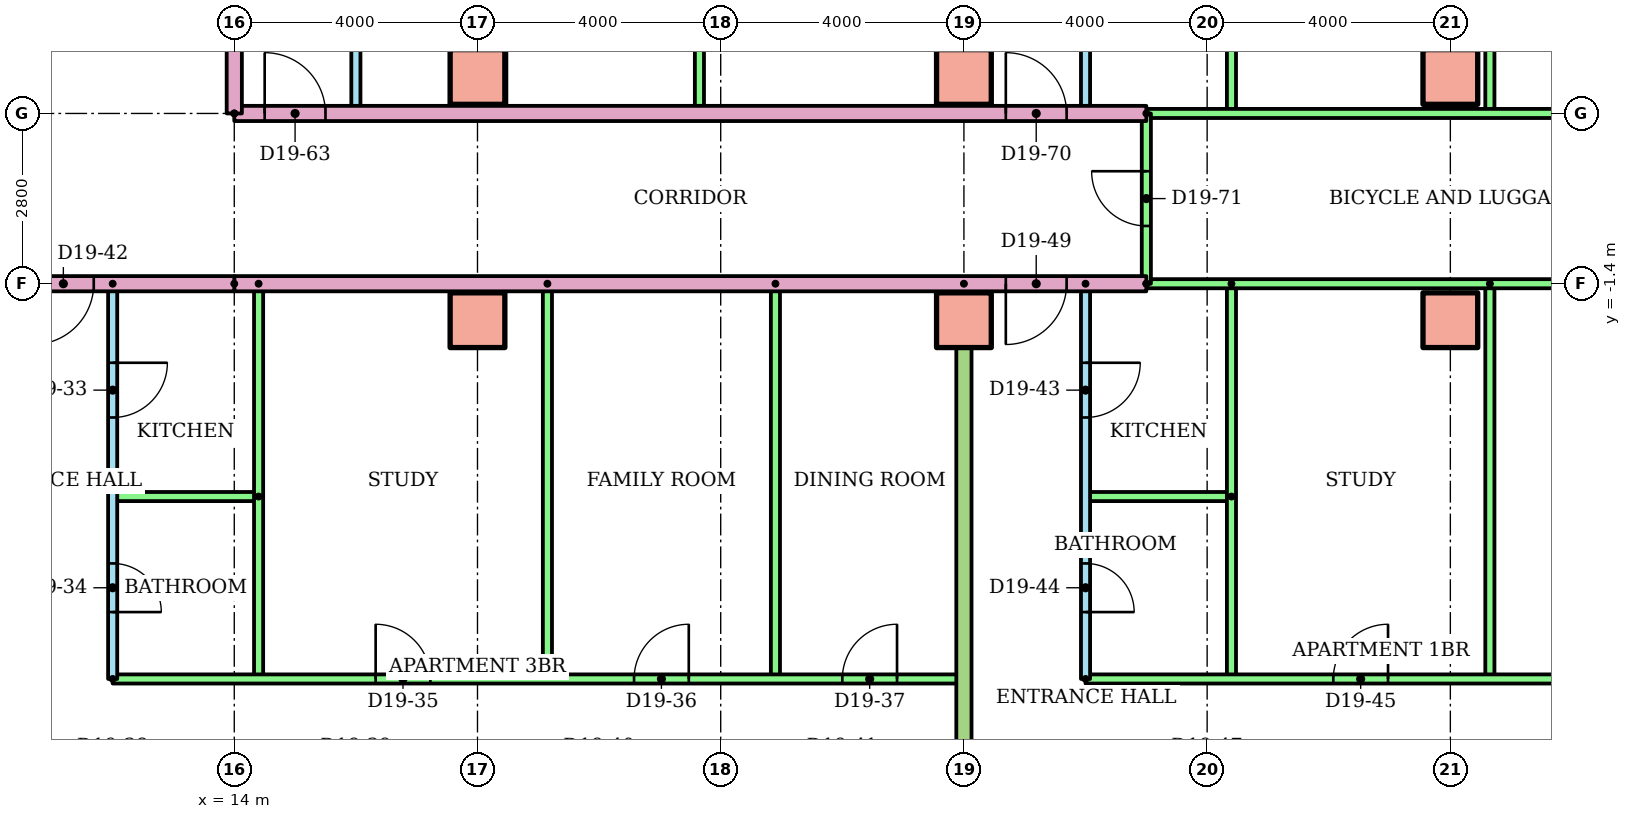
"""IFC4 building model, lengths in metres.
Left out: names, types, materials, properties, quantities, classifications, styles, units other than length and angle.
Written with IfcOpenShell. Run it as: python <this file> out.ifc"""

import sys

from ifc_helpers import new_model, si_unit, direction, frame, frame_2d, origin, origin_2d, place, context, subcontext, project, spatial, rectangle, extrude, element, fill, save


model = new_model("IFC4")
c1 = context("Model", 3, precision=1e-05, world=origin(), true_north=direction((0.0, 1.0)))
c2 = subcontext(c1, "Body", "Model", "MODEL_VIEW")
j1 = project(units=[si_unit("LENGTHUNIT", "METRE"), si_unit("PLANEANGLEUNIT", "RADIAN")], contexts=[c1])
p1 = place(None, origin())
s1 = spatial("IfcSite", under=j1, at=p1, CompositionType="ELEMENT")
p2 = place(p1, origin())
s2 = spatial("IfcBuilding", under=s1, at=p2, CompositionType="ELEMENT")
p3 = place(p2, frame((0.0, 0.0, 77.5)))
s3 = spatial("IfcBuildingStorey", under=s2, at=p3, CompositionType="ELEMENT", Elevation=77.5)
for number, where in (
    (1, (18.0, -2.0, 0.0)),
    (2, (26.0, -2.0, 0.0)),
    (3, (34.0, -2.0, 0.0)),
    (4, (18.0, 2.0, 0.0)),
    (5, (26.0, 2.0, 0.0)),
    (6, (34.0, 2.0, 0.0)),
):
    element("IfcColumn", number, at=place(p3, frame(where)), inside=s3, PredefinedType="COLUMN", context=c2, shape_type="SweptSolid", body=[
        extrude(rectangle(XDim=0.9, YDim=0.9, at=origin_2d()), origin(), (0.0, 0.0, 1.0), 3.2),
    ])
p4 = place(p3, frame((12.0, -1.4, 0.0), z_axis=(0.0, 0.0, 1.0), x_axis=(0.0, -1.0, 0.0)))
e7 = element("IfcWall", 7, at=p4, inside=s3, PredefinedType="PARTITIONING", context=c2, shape_type="SweptSolid", body=[
    extrude(rectangle(XDim=6.5, YDim=0.15, at=frame_2d((3.25, 0.0))), origin(), (0.0, 0.0, 1.0), 2.4),
])
p5 = place(p4, frame((1.3, 0.0, 0.0)))
e8 = element("IfcOpeningElement", 8, at=p5, cuts=e7, PredefinedType="OPENING", context=c2, shape_type="SweptSolid", body=[
    extrude(rectangle(XDim=0.9, YDim=2.1, at=frame_2d((0.45, 1.05))), frame((0.0, 0.085, 0.0), z_axis=(0.0, -1.0, 0.0), x_axis=(1.0, 0.0, 0.0)), (0.0, 0.0, 1.0), 0.17),
])
p6 = place(p4, frame((4.6, 0.0, 0.0)))
e9 = element("IfcOpeningElement", 9, at=p6, cuts=e7, PredefinedType="OPENING", context=c2, shape_type="SweptSolid", body=[
    extrude(rectangle(XDim=0.8, YDim=2.1, at=frame_2d((0.4, 1.05))), frame((0.0, 0.085, 0.0), z_axis=(0.0, -1.0, 0.0), x_axis=(1.0, 0.0, 0.0)), (0.0, 0.0, 1.0), 0.17),
])
p7 = place(p3, frame((14.4, -4.9, 0.0), z_axis=(0.0, 0.0, 1.0), x_axis=(-1.0, 0.0, 0.0)))
e10 = element("IfcWall", 10, at=p7, inside=s3, PredefinedType="PARTITIONING", context=c2, shape_type="SweptSolid", body=[
    extrude(rectangle(XDim=2.4, YDim=0.15, at=frame_2d((1.2, 0.0))), origin(), (0.0, 0.0, 1.0), 2.4),
])
for number, where, z_axis, x_axis in (
    (11, (14.4, -1.4, 0.0), (0.0, 0.0, 1.0), (0.0, -1.0, 0.0)),
    (12, (19.15, -1.4, 0.0), (0.0, 0.0, 1.0), (0.0, -1.0, 0.0)),
    (13, (22.9, -1.4, 0.0), (0.0, 0.0, 1.0), (0.0, -1.0, 0.0)),
):
    element("IfcWall", number, at=place(p3, frame(where, z_axis=z_axis, x_axis=x_axis)), inside=s3, PredefinedType="PARTITIONING", context=c2, shape_type="SweptSolid", body=[
        extrude(rectangle(XDim=6.5, YDim=0.15, at=frame_2d((3.25, 0.0))), origin(), (0.0, 0.0, 1.0), 2.4),
    ])
p8 = place(p3, frame((12.0, -7.9, 0.0)))
e14 = element("IfcWall", 14, at=p8, inside=s3, PredefinedType="PARTITIONING", context=c2, shape_type="SweptSolid", body=[
    extrude(rectangle(XDim=14.0, YDim=0.15, at=frame_2d((7.0, 0.0))), origin(), (0.0, 0.0, 1.0), 2.4),
])
p9 = place(p8, frame((4.325, 0.0, 0.0)))
e15 = element("IfcOpeningElement", 15, at=p9, cuts=e14, PredefinedType="OPENING", context=c2, shape_type="SweptSolid", body=[
    extrude(rectangle(XDim=0.9, YDim=2.1, at=frame_2d((0.45, 1.05))), frame((0.0, 0.085, 0.0), z_axis=(0.0, -1.0, 0.0), x_axis=(1.0, 0.0, 0.0)), (0.0, 0.0, 1.0), 0.17),
])
p10 = place(p8, frame((8.575, 0.0, 0.0)))
e16 = element("IfcOpeningElement", 16, at=p10, cuts=e14, PredefinedType="OPENING", context=c2, shape_type="SweptSolid", body=[
    extrude(rectangle(XDim=0.9, YDim=2.1, at=frame_2d((0.45, 1.05))), frame((0.0, 0.085, 0.0), z_axis=(0.0, -1.0, 0.0), x_axis=(1.0, 0.0, 0.0)), (0.0, 0.0, 1.0), 0.17),
])
p11 = place(p8, frame((12.0, 0.0, 0.0)))
e17 = element("IfcOpeningElement", 17, at=p11, cuts=e14, PredefinedType="OPENING", context=c2, shape_type="SweptSolid", body=[
    extrude(rectangle(XDim=0.9, YDim=2.1, at=frame_2d((0.45, 1.05))), frame((0.0, 0.085, 0.0), z_axis=(0.0, -1.0, 0.0), x_axis=(1.0, 0.0, 0.0)), (0.0, 0.0, 1.0), 0.17),
])
p12 = place(p3, frame((28.0, -1.4, 0.0), z_axis=(0.0, 0.0, 1.0), x_axis=(0.0, -1.0, 0.0)))
e18 = element("IfcWall", 18, at=p12, inside=s3, PredefinedType="PARTITIONING", context=c2, shape_type="SweptSolid", body=[
    extrude(rectangle(XDim=6.5, YDim=0.15, at=frame_2d((3.25, 0.0))), origin(), (0.0, 0.0, 1.0), 2.4),
])
p13 = place(p12, frame((1.3, 0.0, 0.0)))
e19 = element("IfcOpeningElement", 19, at=p13, cuts=e18, PredefinedType="OPENING", context=c2, shape_type="SweptSolid", body=[
    extrude(rectangle(XDim=0.9, YDim=2.1, at=frame_2d((0.45, 1.05))), frame((0.0, 0.085, 0.0), z_axis=(0.0, -1.0, 0.0), x_axis=(1.0, 0.0, 0.0)), (0.0, 0.0, 1.0), 0.17),
])
p14 = place(p12, frame((4.6, 0.0, 0.0)))
e20 = element("IfcOpeningElement", 20, at=p14, cuts=e18, PredefinedType="OPENING", context=c2, shape_type="SweptSolid", body=[
    extrude(rectangle(XDim=0.8, YDim=2.1, at=frame_2d((0.4, 1.05))), frame((0.0, 0.085, 0.0), z_axis=(0.0, -1.0, 0.0), x_axis=(1.0, 0.0, 0.0)), (0.0, 0.0, 1.0), 0.17),
])
p15 = place(p3, frame((30.4, -4.9, 0.0), z_axis=(0.0, 0.0, 1.0), x_axis=(-1.0, 0.0, 0.0)))
e21 = element("IfcWall", 21, at=p15, inside=s3, PredefinedType="PARTITIONING", context=c2, shape_type="SweptSolid", body=[
    extrude(rectangle(XDim=2.4, YDim=0.15, at=frame_2d((1.2, 0.0))), origin(), (0.0, 0.0, 1.0), 2.4),
])
for number, where, z_axis, x_axis in (
    (22, (30.4, -1.4, 0.0), (0.0, 0.0, 1.0), (0.0, -1.0, 0.0)),
    (23, (34.65, -1.4, 0.0), (0.0, 0.0, 1.0), (0.0, -1.0, 0.0)),
):
    element("IfcWall", number, at=place(p3, frame(where, z_axis=z_axis, x_axis=x_axis)), inside=s3, PredefinedType="PARTITIONING", context=c2, shape_type="SweptSolid", body=[
        extrude(rectangle(XDim=6.5, YDim=0.15, at=frame_2d((3.25, 0.0))), origin(), (0.0, 0.0, 1.0), 2.4),
    ])
p16 = place(p3, frame((28.0, -7.9, 0.0)))
e24 = element("IfcWall", 24, at=p16, inside=s3, PredefinedType="PARTITIONING", context=c2, shape_type="SweptSolid", body=[
    extrude(rectangle(XDim=12.62, YDim=0.15, at=frame_2d((6.31, 0.0))), origin(), (0.0, 0.0, 1.0), 2.4),
])
p17 = place(p16, frame((4.075, 0.0, 0.0)))
e25 = element("IfcOpeningElement", 25, at=p17, cuts=e24, PredefinedType="OPENING", context=c2, shape_type="SweptSolid", body=[
    extrude(rectangle(XDim=0.9, YDim=2.1, at=frame_2d((0.45, 1.05))), frame((0.0, 0.085, 0.0), z_axis=(0.0, -1.0, 0.0), x_axis=(1.0, 0.0, 0.0)), (0.0, 0.0, 1.0), 0.17),
])
p18 = place(p16, frame((9.075, 0.0, 0.0)))
e26 = element("IfcOpeningElement", 26, at=p18, cuts=e24, PredefinedType="OPENING", context=c2, shape_type="SweptSolid", body=[
    extrude(rectangle(XDim=0.9, YDim=2.1, at=frame_2d((0.45, 1.05))), frame((0.0, 0.085, 0.0), z_axis=(0.0, -1.0, 0.0), x_axis=(1.0, 0.0, 0.0)), (0.0, 0.0, 1.0), 0.17),
])
p19 = place(p3, frame((26.0, -1.4, 0.0), z_axis=(0.0, 0.0, 1.0), x_axis=(0.0, -1.0, 0.0)))
e27 = element("IfcWall", 27, at=p19, inside=s3, PredefinedType="PARTITIONING", context=c2, shape_type="SweptSolid", body=[
    extrude(rectangle(XDim=14.81, YDim=0.25, at=frame_2d((7.405, 0.0))), origin(), (0.0, 0.0, 1.0), 2.4),
])
p20 = place(p3, frame((29.0, -1.4, 0.0), z_axis=(0.0, 0.0, 1.0), x_axis=(-1.0, 0.0, 0.0)))
e28 = element("IfcWall", 28, at=p20, inside=s3, PredefinedType="PARTITIONING", context=c2, shape_type="SweptSolid", body=[
    extrude(rectangle(XDim=15.0, YDim=0.25, at=frame_2d((7.5, 0.0))), origin(), (0.0, 0.0, 1.0), 2.4),
])
p21 = place(p20, frame((1.311, 0.0, 0.0)))
e29 = element("IfcOpeningElement", 29, at=p21, cuts=e28, PredefinedType="OPENING", context=c2, shape_type="SweptSolid", body=[
    extrude(rectangle(XDim=1.0, YDim=2.1, at=frame_2d((0.5, 1.05))), frame((0.0, 0.135, 0.0), z_axis=(0.0, -1.0, 0.0), x_axis=(1.0, 0.0, 0.0)), (0.0, 0.0, 1.0), 0.27),
])
p22 = place(p3, frame((40.62, -1.4, 0.0), z_axis=(0.0, 0.0, 1.0), x_axis=(-1.0, 0.0, 0.0)))
e30 = element("IfcWall", 30, at=p22, inside=s3, PredefinedType="PARTITIONING", context=c2, shape_type="SweptSolid", body=[
    extrude(rectangle(XDim=11.62, YDim=0.15, at=frame_2d((5.81, 0.0))), origin(), (0.0, 0.0, 1.0), 2.4),
])
p23 = place(p3, frame((16.0, 10.3, 0.0), z_axis=(0.0, 0.0, 1.0), x_axis=(0.0, -1.0, 0.0)))
e31 = element("IfcWall", 31, at=p23, inside=s3, PredefinedType="PARTITIONING", context=c2, shape_type="SweptSolid", body=[
    extrude(rectangle(XDim=8.9, YDim=0.15, at=frame_2d((4.45, 0.0))), origin(), (0.0, 0.0, 1.0), 2.4),
])
p24 = place(p23, frame((5.95, 0.0, 0.0)))
e32 = element("IfcOpeningElement", 32, at=p24, cuts=e31, PredefinedType="OPENING", context=c2, shape_type="SweptSolid", body=[
    extrude(rectangle(XDim=0.9, YDim=2.1, at=frame_2d((0.45, 1.05))), frame((0.0, 0.085, 0.0), z_axis=(0.0, -1.0, 0.0), x_axis=(1.0, 0.0, 0.0)), (0.0, 0.0, 1.0), 0.17),
])
p25 = place(p23, frame((1.55, 0.0, 0.0)))
e33 = element("IfcOpeningElement", 33, at=p25, cuts=e31, PredefinedType="OPENING", context=c2, shape_type="SweptSolid", body=[
    extrude(rectangle(XDim=0.8, YDim=2.1, at=frame_2d((0.4, 1.05))), frame((0.0, 0.085, 0.0), z_axis=(0.0, -1.0, 0.0), x_axis=(1.0, 0.0, 0.0)), (0.0, 0.0, 1.0), 0.17),
])
for number, where, z_axis, x_axis in (
    (34, (18.4, 10.3, 0.0), (0.0, 0.0, 1.0), (0.0, -1.0, 0.0)),
    (35, (21.65, 10.3, 0.0), (0.0, 0.0, 1.0), (0.0, -1.0, 0.0)),
):
    element("IfcWall", number, at=place(p3, frame(where, z_axis=z_axis, x_axis=x_axis)), inside=s3, PredefinedType="PARTITIONING", context=c2, shape_type="SweptSolid", body=[
        extrude(rectangle(XDim=8.9, YDim=0.15, at=frame_2d((4.45, 0.0))), origin(), (0.0, 0.0, 1.0), 2.4),
    ])
p26 = place(p3, frame((28.0, 10.3, 0.0), z_axis=(0.0, 0.0, 1.0), x_axis=(0.0, -1.0, 0.0)))
e36 = element("IfcWall", 36, at=p26, inside=s3, PredefinedType="PARTITIONING", context=c2, shape_type="SweptSolid", body=[
    extrude(rectangle(XDim=8.9, YDim=0.15, at=frame_2d((4.45, 0.0))), origin(), (0.0, 0.0, 1.0), 2.4),
])
p27 = place(p26, frame((5.95, 0.0, 0.0)))
e37 = element("IfcOpeningElement", 37, at=p27, cuts=e36, PredefinedType="OPENING", context=c2, shape_type="SweptSolid", body=[
    extrude(rectangle(XDim=0.9, YDim=2.1, at=frame_2d((0.45, 1.05))), frame((0.0, 0.085, 0.0), z_axis=(0.0, -1.0, 0.0), x_axis=(1.0, 0.0, 0.0)), (0.0, 0.0, 1.0), 0.17),
])
p28 = place(p26, frame((1.55, 0.0, 0.0)))
e38 = element("IfcOpeningElement", 38, at=p28, cuts=e36, PredefinedType="OPENING", context=c2, shape_type="SweptSolid", body=[
    extrude(rectangle(XDim=0.8, YDim=2.1, at=frame_2d((0.4, 1.05))), frame((0.0, 0.085, 0.0), z_axis=(0.0, -1.0, 0.0), x_axis=(1.0, 0.0, 0.0)), (0.0, 0.0, 1.0), 0.17),
])
for number, where, z_axis, x_axis in (
    (39, (30.4, 10.3, 0.0), (0.0, 0.0, 1.0), (0.0, -1.0, 0.0)),
    (40, (34.65, 10.3, 0.0), (0.0, 0.0, 1.0), (0.0, -1.0, 0.0)),
):
    element("IfcWall", number, at=place(p3, frame(where, z_axis=z_axis, x_axis=x_axis)), inside=s3, PredefinedType="PARTITIONING", context=c2, shape_type="SweptSolid", body=[
        extrude(rectangle(XDim=8.9, YDim=0.15, at=frame_2d((4.45, 0.0))), origin(), (0.0, 0.0, 1.0), 2.4),
    ])
p29 = place(p3, frame((26.0, 18.621, 0.0), z_axis=(0.0, 0.0, 1.0), x_axis=(0.0, -1.0, 0.0)))
e41 = element("IfcWall", 41, at=p29, inside=s3, PredefinedType="PARTITIONING", context=c2, shape_type="SweptSolid", body=[
    extrude(rectangle(XDim=17.221, YDim=0.25, at=frame_2d((8.611, 0.0))), origin(), (0.0, 0.0, 1.0), 2.4),
])
p30 = place(p3, frame((14.0, 1.4, 0.0)))
e42 = element("IfcWall", 42, at=p30, inside=s3, PredefinedType="PARTITIONING", context=c2, shape_type="SweptSolid", body=[
    extrude(rectangle(XDim=15.0, YDim=0.25, at=frame_2d((7.5, 0.0))), origin(), (0.0, 0.0, 1.0), 2.4),
])
p31 = place(p30, frame((0.5, 0.0, 0.0)))
e43 = element("IfcOpeningElement", 43, at=p31, cuts=e42, PredefinedType="OPENING", context=c2, shape_type="SweptSolid", body=[
    extrude(rectangle(XDim=1.0, YDim=2.1, at=frame_2d((0.5, 1.05))), frame((0.0, 0.135, 0.0), z_axis=(0.0, -1.0, 0.0), x_axis=(1.0, 0.0, 0.0)), (0.0, 0.0, 1.0), 0.27),
])
p32 = place(p30, frame((12.689, 0.0, 0.0)))
e44 = element("IfcOpeningElement", 44, at=p32, cuts=e42, PredefinedType="OPENING", context=c2, shape_type="SweptSolid", body=[
    extrude(rectangle(XDim=1.0, YDim=2.1, at=frame_2d((0.5, 1.05))), frame((0.0, 0.135, 0.0), z_axis=(0.0, -1.0, 0.0), x_axis=(1.0, 0.0, 0.0)), (0.0, 0.0, 1.0), 0.27),
])
p33 = place(p3, frame((29.0, 1.4, 0.0)))
e45 = element("IfcWall", 45, at=p33, inside=s3, PredefinedType="PARTITIONING", context=c2, shape_type="SweptSolid", body=[
    extrude(rectangle(XDim=11.62, YDim=0.15, at=frame_2d((5.81, 0.0))), origin(), (0.0, 0.0, 1.0), 2.4),
])
p34 = place(p3, frame((29.0, -1.4, 0.0), z_axis=(0.0, 0.0, 1.0), x_axis=(0.0, 1.0, 0.0)))
e46 = element("IfcWall", 46, at=p34, inside=s3, PredefinedType="PARTITIONING", context=c2, shape_type="SweptSolid", body=[
    extrude(rectangle(XDim=2.8, YDim=0.15, at=frame_2d((1.4, 0.0))), origin(), (0.0, 0.0, 1.0), 2.4),
])
p35 = place(p34, frame((0.95, 0.0, 0.0)))
e47 = element("IfcOpeningElement", 47, at=p35, cuts=e46, PredefinedType="OPENING", context=c2, shape_type="SweptSolid", body=[
    extrude(rectangle(XDim=0.9, YDim=2.1, at=frame_2d((0.45, 1.05))), frame((0.0, 0.085, 0.0), z_axis=(0.0, -1.0, 0.0), x_axis=(1.0, 0.0, 0.0)), (0.0, 0.0, 1.0), 0.17),
])
p36 = place(p3, frame((14.0, -1.4, 0.0), z_axis=(0.0, 0.0, 1.0), x_axis=(-1.0, 0.0, 0.0)))
e48 = element("IfcWall", 48, at=p36, inside=s3, PredefinedType="PARTITIONING", context=c2, shape_type="SweptSolid", body=[
    extrude(rectangle(XDim=28.0, YDim=0.25, at=frame_2d((14.0, 0.0))), origin(), (0.0, 0.0, 1.0), 2.4),
])
p37 = place(p36, frame((20.689, 0.0, 0.0)))
e49 = element("IfcOpeningElement", 49, at=p37, cuts=e48, PredefinedType="OPENING", context=c2, shape_type="SweptSolid", body=[
    extrude(rectangle(XDim=1.0, YDim=2.1, at=frame_2d((0.5, 1.05))), frame((0.0, 0.135, 0.0), z_axis=(0.0, -1.0, 0.0), x_axis=(1.0, 0.0, 0.0)), (0.0, 0.0, 1.0), 0.27),
])
p38 = place(p36, frame((18.311, 0.0, 0.0)))
e50 = element("IfcOpeningElement", 50, at=p38, cuts=e48, PredefinedType="OPENING", context=c2, shape_type="SweptSolid", body=[
    extrude(rectangle(XDim=1.0, YDim=2.1, at=frame_2d((0.5, 1.05))), frame((0.0, 0.135, 0.0), z_axis=(0.0, -1.0, 0.0), x_axis=(1.0, 0.0, 0.0)), (0.0, 0.0, 1.0), 0.27),
])
p39 = place(p36, frame((2.311, 0.0, 0.0)))
e51 = element("IfcOpeningElement", 51, at=p39, cuts=e48, PredefinedType="OPENING", context=c2, shape_type="SweptSolid", body=[
    extrude(rectangle(XDim=1.0, YDim=2.1, at=frame_2d((0.5, 1.05))), frame((0.0, 0.135, 0.0), z_axis=(0.0, -1.0, 0.0), x_axis=(1.0, 0.0, 0.0)), (0.0, 0.0, 1.0), 0.27),
])
p40 = place(p3, frame((14.0, 1.4, 0.0), z_axis=(0.0, 0.0, 1.0), x_axis=(0.0, 1.0, 0.0)))
e52 = element("IfcWall", 52, at=p40, inside=s3, PredefinedType="PARTITIONING", context=c2, shape_type="SweptSolid", body=[
    extrude(rectangle(XDim=1.6, YDim=0.25, at=frame_2d((0.8, 0.0))), origin(), (0.0, 0.0, 1.0), 2.4),
])
p41 = place(p5, origin())
e53 = element("IfcDoor", 53, at=p41, inside=s3, OperationType="SINGLE_SWING_LEFT", PredefinedType="DOOR", context=c2, shape_type="SweptSolid", body=[
    extrude(rectangle(XDim=0.9, YDim=2.1, at=frame_2d((0.45, 1.05))), frame((0.0, 0.025, 0.0), z_axis=(0.0, -1.0, 0.0), x_axis=(1.0, 0.0, 0.0)), (0.0, 0.0, 1.0), 0.05),
])
fill(e8, e53)
p42 = place(p6, origin())
e54 = element("IfcDoor", 54, at=p42, inside=s3, OperationType="SINGLE_SWING_RIGHT", PredefinedType="DOOR", context=c2, shape_type="SweptSolid", body=[
    extrude(rectangle(XDim=0.8, YDim=2.1, at=frame_2d((0.4, 1.05))), frame((0.0, 0.025, 0.0), z_axis=(0.0, -1.0, 0.0), x_axis=(1.0, 0.0, 0.0)), (0.0, 0.0, 1.0), 0.05),
])
fill(e9, e54)
p43 = place(p9, origin())
e55 = element("IfcDoor", 55, at=p43, inside=s3, OperationType="SINGLE_SWING_LEFT", PredefinedType="DOOR", context=c2, shape_type="SweptSolid", body=[
    extrude(rectangle(XDim=0.9, YDim=2.1, at=frame_2d((0.45, 1.05))), frame((0.0, 0.025, 0.0), z_axis=(0.0, -1.0, 0.0), x_axis=(1.0, 0.0, 0.0)), (0.0, 0.0, 1.0), 0.05),
])
fill(e15, e55)
p44 = place(p10, origin())
e56 = element("IfcDoor", 56, at=p44, inside=s3, OperationType="SINGLE_SWING_RIGHT", PredefinedType="DOOR", context=c2, shape_type="SweptSolid", body=[
    extrude(rectangle(XDim=0.9, YDim=2.1, at=frame_2d((0.45, 1.05))), frame((0.0, 0.025, 0.0), z_axis=(0.0, -1.0, 0.0), x_axis=(1.0, 0.0, 0.0)), (0.0, 0.0, 1.0), 0.05),
])
fill(e16, e56)
p45 = place(p11, origin())
e57 = element("IfcDoor", 57, at=p45, inside=s3, OperationType="SINGLE_SWING_RIGHT", PredefinedType="DOOR", context=c2, shape_type="SweptSolid", body=[
    extrude(rectangle(XDim=0.9, YDim=2.1, at=frame_2d((0.45, 1.05))), frame((0.0, 0.025, 0.0), z_axis=(0.0, -1.0, 0.0), x_axis=(1.0, 0.0, 0.0)), (0.0, 0.0, 1.0), 0.05),
])
fill(e17, e57)
p46 = place(p39, origin())
e58 = element("IfcDoor", 58, at=p46, inside=s3, OperationType="SINGLE_SWING_RIGHT", PredefinedType="DOOR", context=c2, shape_type="SweptSolid", body=[
    extrude(rectangle(XDim=1.0, YDim=2.1, at=frame_2d((0.5, 1.05))), frame((0.0, 0.025, 0.0), z_axis=(0.0, -1.0, 0.0), x_axis=(1.0, 0.0, 0.0)), (0.0, 0.0, 1.0), 0.05),
])
fill(e51, e58)
p47 = place(p13, origin())
e59 = element("IfcDoor", 59, at=p47, inside=s3, OperationType="SINGLE_SWING_LEFT", PredefinedType="DOOR", context=c2, shape_type="SweptSolid", body=[
    extrude(rectangle(XDim=0.9, YDim=2.1, at=frame_2d((0.45, 1.05))), frame((0.0, 0.025, 0.0), z_axis=(0.0, -1.0, 0.0), x_axis=(1.0, 0.0, 0.0)), (0.0, 0.0, 1.0), 0.05),
])
fill(e19, e59)
p48 = place(p14, origin())
e60 = element("IfcDoor", 60, at=p48, inside=s3, OperationType="SINGLE_SWING_RIGHT", PredefinedType="DOOR", context=c2, shape_type="SweptSolid", body=[
    extrude(rectangle(XDim=0.8, YDim=2.1, at=frame_2d((0.4, 1.05))), frame((0.0, 0.025, 0.0), z_axis=(0.0, -1.0, 0.0), x_axis=(1.0, 0.0, 0.0)), (0.0, 0.0, 1.0), 0.05),
])
fill(e20, e60)
p49 = place(p17, origin())
e61 = element("IfcDoor", 61, at=p49, inside=s3, OperationType="SINGLE_SWING_RIGHT", PredefinedType="DOOR", context=c2, shape_type="SweptSolid", body=[
    extrude(rectangle(XDim=0.9, YDim=2.1, at=frame_2d((0.45, 1.05))), frame((0.0, 0.025, 0.0), z_axis=(0.0, -1.0, 0.0), x_axis=(1.0, 0.0, 0.0)), (0.0, 0.0, 1.0), 0.05),
])
fill(e25, e61)
p50 = place(p21, origin())
e62 = element("IfcDoor", 62, at=p50, inside=s3, OperationType="SINGLE_SWING_RIGHT", PredefinedType="DOOR", context=c2, shape_type="SweptSolid", body=[
    extrude(rectangle(XDim=1.0, YDim=2.1, at=frame_2d((0.5, 1.05))), frame((0.0, 0.025, 0.0), z_axis=(0.0, -1.0, 0.0), x_axis=(1.0, 0.0, 0.0)), (0.0, 0.0, 1.0), 0.05),
])
fill(e29, e62)
p51 = place(p31, origin())
e63 = element("IfcDoor", 63, at=p51, inside=s3, OperationType="SINGLE_SWING_LEFT", PredefinedType="DOOR", context=c2, shape_type="SweptSolid", body=[
    extrude(rectangle(XDim=1.0, YDim=2.1, at=frame_2d((0.5, 1.05))), frame((0.0, 0.025, 0.0), z_axis=(0.0, -1.0, 0.0), x_axis=(1.0, 0.0, 0.0)), (0.0, 0.0, 1.0), 0.05),
])
fill(e43, e63)
p52 = place(p32, origin())
e64 = element("IfcDoor", 64, at=p52, inside=s3, OperationType="SINGLE_SWING_LEFT", PredefinedType="DOOR", context=c2, shape_type="SweptSolid", body=[
    extrude(rectangle(XDim=1.0, YDim=2.1, at=frame_2d((0.5, 1.05))), frame((0.0, 0.025, 0.0), z_axis=(0.0, -1.0, 0.0), x_axis=(1.0, 0.0, 0.0)), (0.0, 0.0, 1.0), 0.05),
])
fill(e44, e64)
p53 = place(p35, origin())
e65 = element("IfcDoor", 65, at=p53, inside=s3, OperationType="SINGLE_SWING_RIGHT", PredefinedType="DOOR", context=c2, shape_type="SweptSolid", body=[
    extrude(rectangle(XDim=0.9, YDim=2.1, at=frame_2d((0.45, 1.05))), frame((0.0, 0.025, 0.0), z_axis=(0.0, -1.0, 0.0), x_axis=(1.0, 0.0, 0.0)), (0.0, 0.0, 1.0), 0.05),
])
fill(e47, e65)
save(model, sys.argv[1])
